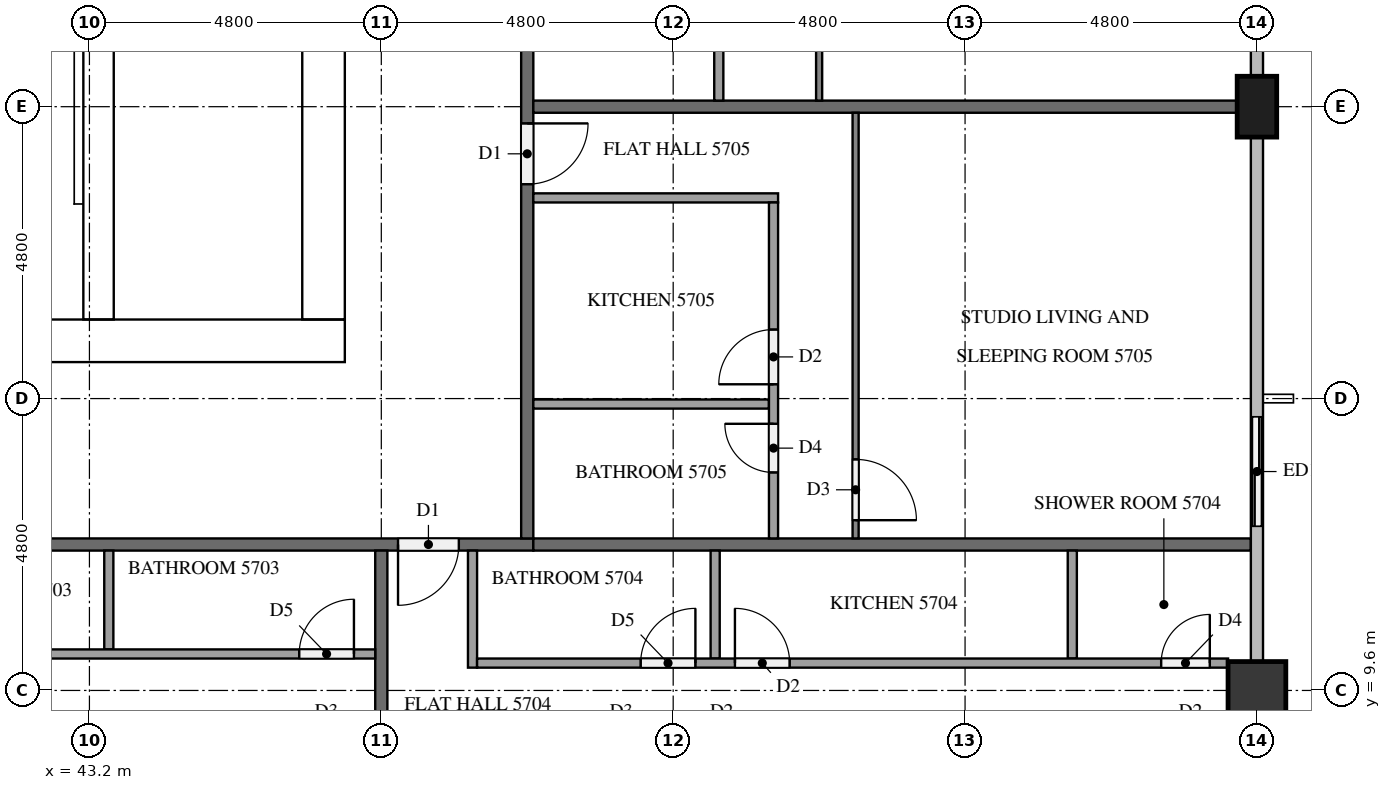
"""IFC4 building model, lengths in metres.
Left out: names, types, materials, properties, quantities, classifications, styles, units other than length and angle.
Written with IfcOpenShell. Run it as: python <this file> out.ifc"""

import sys

from ifc_helpers import new_model, si_unit, direction, frame, frame_2d, origin, origin_2d, place, context, subcontext, project, spatial, rectangle, extrude, element, fill, save


model = new_model("IFC4")
c1 = context("Model", 3, precision=1e-05, world=origin(), true_north=direction((0.0, 1.0)))
c2 = subcontext(c1, "Body", "Model", "MODEL_VIEW")
j1 = project(units=[si_unit("LENGTHUNIT", "METRE"), si_unit("PLANEANGLEUNIT", "RADIAN")], contexts=[c1])
p1 = place(None, origin())
s1 = spatial("IfcSite", under=j1, at=p1, CompositionType="ELEMENT")
p2 = place(p1, origin())
s2 = spatial("IfcBuilding", under=s1, at=p2, CompositionType="ELEMENT")
p3 = place(p2, frame((0.0, 0.0, 219.3)))
s3 = spatial("IfcBuildingStorey", under=s2, at=p3, CompositionType="ELEMENT", Elevation=219.3)
p4 = place(p3, frame((15.0, 15.35, 0.0), z_axis=(0.0, 0.0, 1.0), x_axis=(1.0, 0.0, 0.0)))
e1 = element("IfcWall", 1, at=p4, inside=s3, PredefinedType="SHEAR", context=c2, shape_type="SweptSolid", body=[
    extrude(rectangle(XDim=32.4, YDim=0.7, at=frame_2d((16.2, 0.0))), origin(), (0.0, 0.0, 1.0), 3.2),
])
p5 = place(p4, frame((15.3, 0.0, 0.0)))
e2 = element("IfcOpeningElement", 2, at=p5, cuts=e1, PredefinedType="OPENING", context=c2, shape_type="SweptSolid", body=[
    extrude(rectangle(XDim=1.8, YDim=2.1, at=frame_2d((0.9, 1.05))), frame((0.0, 0.36, 0.0), z_axis=(0.0, -1.0, 0.0), x_axis=(1.0, 0.0, 0.0)), (0.0, 0.0, 1.0), 0.72),
])
p6 = place(p3, frame((47.05, 15.7, 0.0), z_axis=(0.0, 0.0, 1.0), x_axis=(0.0, 1.0, 0.0)))
e3 = element("IfcWall", 3, at=p6, inside=s3, PredefinedType="SHEAR", context=c2, shape_type="SweptSolid", body=[
    extrude(rectangle(XDim=21.4, YDim=0.7, at=frame_2d((10.7, 0.0))), origin(), (0.0, 0.0, 1.0), 3.2),
])
p7 = place(p6, frame((10.4, 0.0, 0.0)))
e4 = element("IfcOpeningElement", 4, at=p7, cuts=e3, PredefinedType="OPENING", context=c2, shape_type="SweptSolid", body=[
    extrude(rectangle(XDim=1.2, YDim=2.1, at=frame_2d((0.6, 1.05))), frame((0.0, 0.36, 0.0), z_axis=(0.0, -1.0, 0.0), x_axis=(1.0, 0.0, 0.0)), (0.0, 0.0, 1.0), 0.72),
])
p8 = place(p3, frame((43.35, 15.7, 0.0), z_axis=(0.0, 0.0, 1.0), x_axis=(0.0, 1.0, 0.0)))
e5 = element("IfcWall", 5, at=p8, inside=s3, PredefinedType="SHEAR", context=c2, shape_type="SweptSolid", body=[
    extrude(rectangle(XDim=8.55, YDim=0.5, at=frame_2d((4.275, 0.0))), origin(), (0.0, 0.0, 1.0), 3.2),
])
p9 = place(p8, frame((0.5, 0.0, 0.0)))
e6 = element("IfcOpeningElement", 6, at=p9, cuts=e5, PredefinedType="OPENING", context=c2, shape_type="SweptSolid", body=[
    extrude(rectangle(XDim=1.2, YDim=2.1, at=frame_2d((0.6, 1.05))), frame((0.0, 0.26, 0.0), z_axis=(0.0, -1.0, 0.0), x_axis=(1.0, 0.0, 0.0)), (0.0, 0.0, 1.0), 0.52),
])
p10 = place(p3, frame((62.4, 9.6, 0.0), z_axis=(0.0, 0.0, 1.0), x_axis=(1.0, 0.0, 0.0)))
e7 = element("IfcColumn", 7, at=p10, inside=s3, PredefinedType="COLUMN", context=c2, shape_type="SweptSolid", body=[
    extrude(rectangle(XDim=0.95, YDim=0.95, at=origin_2d()), origin(), (0.0, 0.0, 1.0), 3.2),
])
p11 = place(p3, frame((62.4, 19.2, 0.0), z_axis=(0.0, 0.0, 1.0), x_axis=(0.0, 1.0, 0.0)))
e8 = element("IfcColumn", 8, at=p11, inside=s3, PredefinedType="COLUMN", context=c2, shape_type="SweptSolid", body=[
    extrude(rectangle(XDim=1.0, YDim=0.65, at=origin_2d()), origin(), (0.0, 0.0, 1.0), 3.2),
])
p12 = place(p3, frame((62.4, 12.0, 0.0), z_axis=(0.0, 0.0, 1.0), x_axis=(0.0, 1.0, 0.0)))
e9 = element("IfcWall", 9, at=p12, inside=s3, PredefinedType="SOLIDWALL", context=c2, shape_type="SweptSolid", body=[
    extrude(rectangle(XDim=2.4, YDim=0.15, at=frame_2d((1.2, 0.0))), origin(), (0.0, 0.0, 1.0), 3.2),
])
p13 = place(p12, frame((0.3, 0.0, 0.0)))
e10 = element("IfcOpeningElement", 10, at=p13, cuts=e9, PredefinedType="OPENING", context=c2, shape_type="SweptSolid", body=[
    extrude(rectangle(XDim=1.8, YDim=2.4, at=frame_2d((0.9, 1.2))), frame((0.0, 0.085, 0.0), z_axis=(0.0, -1.0, 0.0), x_axis=(1.0, 0.0, 0.0)), (0.0, 0.0, 1.0), 0.17),
])
p14 = place(p3, frame((50.5, 12.0, 0.0), z_axis=(0.0, 0.0, 1.0), x_axis=(-1.0, 0.0, 0.0)))
e11 = element("IfcWall", 11, at=p14, inside=s3, PredefinedType="PARTITIONING", context=c2, shape_type="SweptSolid", body=[
    extrude(rectangle(XDim=38.6, YDim=0.2, at=frame_2d((19.3, 0.0))), origin(), (0.0, 0.0, 1.0), 3.2),
])
p15 = place(p14, frame((36.375, 0.0, 0.0)))
e12 = element("IfcOpeningElement", 12, at=p15, cuts=e11, PredefinedType="OPENING", context=c2, shape_type="SweptSolid", body=[
    extrude(rectangle(XDim=1.0, YDim=2.1, at=frame_2d((0.5, 1.05))), frame((0.0, 0.11, 0.0), z_axis=(0.0, -1.0, 0.0), x_axis=(1.0, 0.0, 0.0)), (0.0, 0.0, 1.0), 0.22),
])
p16 = place(p14, frame((34.825, 0.0, 0.0)))
e13 = element("IfcOpeningElement", 13, at=p16, cuts=e11, PredefinedType="OPENING", context=c2, shape_type="SweptSolid", body=[
    extrude(rectangle(XDim=1.0, YDim=2.1, at=frame_2d((0.5, 1.05))), frame((0.0, 0.11, 0.0), z_axis=(0.0, -1.0, 0.0), x_axis=(1.0, 0.0, 0.0)), (0.0, 0.0, 1.0), 0.22),
])
p17 = place(p14, frame((20.375, 0.0, 0.0)))
e14 = element("IfcOpeningElement", 14, at=p17, cuts=e11, PredefinedType="OPENING", context=c2, shape_type="SweptSolid", body=[
    extrude(rectangle(XDim=1.1, YDim=2.1, at=frame_2d((0.55, 1.05))), frame((0.0, 0.11, 0.0), z_axis=(0.0, -1.0, 0.0), x_axis=(1.0, 0.0, 0.0)), (0.0, 0.0, 1.0), 0.22),
])
p18 = place(p14, frame((1.225, 0.0, 0.0)))
e15 = element("IfcOpeningElement", 15, at=p18, cuts=e11, PredefinedType="OPENING", context=c2, shape_type="SweptSolid", body=[
    extrude(rectangle(XDim=1.0, YDim=2.1, at=frame_2d((0.5, 1.05))), frame((0.0, 0.11, 0.0), z_axis=(0.0, -1.0, 0.0), x_axis=(1.0, 0.0, 0.0)), (0.0, 0.0, 1.0), 0.22),
])
p19 = place(p3, frame((50.4, 40.7, 0.0), z_axis=(0.0, 0.0, 1.0), x_axis=(0.0, -1.0, 0.0)))
e16 = element("IfcWall", 16, at=p19, inside=s3, PredefinedType="PARTITIONING", context=c2, shape_type="SweptSolid", body=[
    extrude(rectangle(XDim=28.6, YDim=0.2, at=frame_2d((14.3, 0.0))), origin(), (0.0, 0.0, 1.0), 3.2),
])
p20 = place(p19, frame((21.775, 0.0, 0.0)))
e17 = element("IfcOpeningElement", 17, at=p20, cuts=e16, PredefinedType="OPENING", context=c2, shape_type="SweptSolid", body=[
    extrude(rectangle(XDim=1.0, YDim=2.1, at=frame_2d((0.5, 1.05))), frame((0.0, 0.11, 0.0), z_axis=(0.0, -1.0, 0.0), x_axis=(1.0, 0.0, 0.0)), (0.0, 0.0, 1.0), 0.22),
])
p21 = place(p19, frame((7.375, 0.0, 0.0)))
e18 = element("IfcOpeningElement", 18, at=p21, cuts=e16, PredefinedType="OPENING", context=c2, shape_type="SweptSolid", body=[
    extrude(rectangle(XDim=1.0, YDim=2.1, at=frame_2d((0.5, 1.05))), frame((0.0, 0.11, 0.0), z_axis=(0.0, -1.0, 0.0), x_axis=(1.0, 0.0, 0.0)), (0.0, 0.0, 1.0), 0.22),
])
p22 = place(p19, frame((0.175, 0.0, 0.0)))
e19 = element("IfcOpeningElement", 19, at=p22, cuts=e16, PredefinedType="OPENING", context=c2, shape_type="SweptSolid", body=[
    extrude(rectangle(XDim=1.0, YDim=2.1, at=frame_2d((0.5, 1.05))), frame((0.0, 0.11, 0.0), z_axis=(0.0, -1.0, 0.0), x_axis=(1.0, 0.0, 0.0)), (0.0, 0.0, 1.0), 0.22),
])
p23 = place(p3, frame((48.0, 11.9, 0.0), z_axis=(0.0, 0.0, 1.0), x_axis=(0.0, -1.0, 0.0)))
e20 = element("IfcWall", 20, at=p23, inside=s3, PredefinedType="PARTITIONING", context=c2, shape_type="SweptSolid", body=[
    extrude(rectangle(XDim=6.775, YDim=0.2, at=frame_2d((3.387, 0.0))), origin(), (0.0, 0.0, 1.0), 3.2),
])
p24 = place(p3, frame((50.5, 12.0, 0.0), z_axis=(0.0, 0.0, 1.0), x_axis=(1.0, 0.0, 0.0)))
e21 = element("IfcWall", 21, at=p24, inside=s3, PredefinedType="PARTITIONING", context=c2, shape_type="SweptSolid", body=[
    extrude(rectangle(XDim=11.8, YDim=0.2, at=frame_2d((5.9, 0.0))), origin(), (0.0, 0.0, 1.0), 3.2),
])
p25 = place(p3, frame((50.5, 19.2, 0.0), z_axis=(0.0, 0.0, 1.0), x_axis=(1.0, 0.0, 0.0)))
e22 = element("IfcWall", 22, at=p25, inside=s3, PredefinedType="PARTITIONING", context=c2, shape_type="SweptSolid", body=[
    extrude(rectangle(XDim=11.575, YDim=0.2, at=frame_2d((5.788, 0.0))), origin(), (0.0, 0.0, 1.0), 3.2),
])
p26 = place(p3, frame((43.519, 11.9, 0.0), z_axis=(0.0, 0.0, 1.0), x_axis=(0.0, -1.0, 0.0)))
e23 = element("IfcWall", 23, at=p26, inside=s3, PredefinedType="PARTITIONING", context=c2, shape_type="SweptSolid", body=[
    extrude(rectangle(XDim=1.625, YDim=0.15, at=frame_2d((0.812, 0.0))), origin(), (0.0, 0.0, 1.0), 3.2),
])
p27 = place(p3, frame((30.375, 10.2, 0.0), z_axis=(0.0, 0.0, 1.0), x_axis=(1.0, 0.0, 0.0)))
e24 = element("IfcWall", 24, at=p27, inside=s3, PredefinedType="PARTITIONING", context=c2, shape_type="SweptSolid", body=[
    extrude(rectangle(XDim=17.525, YDim=0.15, at=frame_2d((8.762, 0.0))), origin(), (0.0, 0.0, 1.0), 3.2),
])
p28 = place(p27, frame((0.3, 0.0, 0.0)))
e25 = element("IfcOpeningElement", 25, at=p28, cuts=e24, PredefinedType="OPENING", context=c2, shape_type="SweptSolid", body=[
    extrude(rectangle(XDim=0.9, YDim=2.1, at=frame_2d((0.45, 1.05))), frame((0.0, 0.085, 0.0), z_axis=(0.0, -1.0, 0.0), x_axis=(1.0, 0.0, 0.0)), (0.0, 0.0, 1.0), 0.17),
])
p29 = place(p27, frame((8.733, 0.0, 0.0)))
e26 = element("IfcOpeningElement", 26, at=p29, cuts=e24, PredefinedType="OPENING", context=c2, shape_type="SweptSolid", body=[
    extrude(rectangle(XDim=0.8, YDim=2.1, at=frame_2d((0.4, 1.05))), frame((0.0, 0.085, 0.0), z_axis=(0.0, -1.0, 0.0), x_axis=(1.0, 0.0, 0.0)), (0.0, 0.0, 1.0), 0.17),
])
p30 = place(p27, frame((10.183, 0.0, 0.0)))
e27 = element("IfcOpeningElement", 27, at=p30, cuts=e24, PredefinedType="OPENING", context=c2, shape_type="SweptSolid", body=[
    extrude(rectangle(XDim=0.8, YDim=2.1, at=frame_2d((0.4, 1.05))), frame((0.0, 0.085, 0.0), z_axis=(0.0, -1.0, 0.0), x_axis=(1.0, 0.0, 0.0)), (0.0, 0.0, 1.0), 0.17),
])
p31 = place(p27, frame((16.275, 0.0, 0.0)))
e28 = element("IfcOpeningElement", 28, at=p31, cuts=e24, PredefinedType="OPENING", context=c2, shape_type="SweptSolid", body=[
    extrude(rectangle(XDim=0.9, YDim=2.1, at=frame_2d((0.45, 1.05))), frame((0.0, 0.085, 0.0), z_axis=(0.0, -1.0, 0.0), x_axis=(1.0, 0.0, 0.0)), (0.0, 0.0, 1.0), 0.17),
])
for number, where, z_axis, x_axis in (
    (29, (53.49, 11.9, 0.0), (0.0, 0.0, 1.0), (0.0, -1.0, 0.0)),
    (30, (59.364, 11.9, 0.0), (0.0, 0.0, 1.0), (0.0, -1.0, 0.0)),
):
    element("IfcWall", number, at=place(p3, frame(where, z_axis=z_axis, x_axis=x_axis)), inside=s3, PredefinedType="PARTITIONING", context=c2, shape_type="SweptSolid", body=[
        extrude(rectangle(XDim=1.775, YDim=0.15, at=frame_2d((0.887, 0.0))), origin(), (0.0, 0.0, 1.0), 3.2),
    ])
p32 = place(p3, frame((49.5, 11.9, 0.0), z_axis=(0.0, 0.0, 1.0), x_axis=(0.0, -1.0, 0.0)))
e31 = element("IfcWall", 31, at=p32, inside=s3, PredefinedType="PARTITIONING", context=c2, shape_type="SweptSolid", body=[
    extrude(rectangle(XDim=1.925, YDim=0.15, at=frame_2d((0.962, 0.0))), origin(), (0.0, 0.0, 1.0), 3.2),
])
p33 = place(p3, frame((49.575, 10.05, 0.0), z_axis=(0.0, 0.0, 1.0), x_axis=(1.0, 0.0, 0.0)))
e32 = element("IfcWall", 32, at=p33, inside=s3, PredefinedType="PARTITIONING", context=c2, shape_type="SweptSolid", body=[
    extrude(rectangle(XDim=12.35, YDim=0.15, at=frame_2d((6.175, 0.0))), origin(), (0.0, 0.0, 1.0), 3.2),
])
p34 = place(p33, frame((2.69, 0.0, 0.0)))
e33 = element("IfcOpeningElement", 33, at=p34, cuts=e32, PredefinedType="OPENING", context=c2, shape_type="SweptSolid", body=[
    extrude(rectangle(XDim=0.9, YDim=2.1, at=frame_2d((0.45, 1.05))), frame((0.0, 0.085, 0.0), z_axis=(0.0, -1.0, 0.0), x_axis=(1.0, 0.0, 0.0)), (0.0, 0.0, 1.0), 0.17),
])
p35 = place(p33, frame((4.24, 0.0, 0.0)))
e34 = element("IfcOpeningElement", 34, at=p35, cuts=e32, PredefinedType="OPENING", context=c2, shape_type="SweptSolid", body=[
    extrude(rectangle(XDim=0.9, YDim=2.1, at=frame_2d((0.45, 1.05))), frame((0.0, 0.085, 0.0), z_axis=(0.0, -1.0, 0.0), x_axis=(1.0, 0.0, 0.0)), (0.0, 0.0, 1.0), 0.17),
])
p36 = place(p33, frame((11.25, 0.0, 0.0)))
e35 = element("IfcOpeningElement", 35, at=p36, cuts=e32, PredefinedType="OPENING", context=c2, shape_type="SweptSolid", body=[
    extrude(rectangle(XDim=0.8, YDim=2.1, at=frame_2d((0.4, 1.05))), frame((0.0, 0.085, 0.0), z_axis=(0.0, -1.0, 0.0), x_axis=(1.0, 0.0, 0.0)), (0.0, 0.0, 1.0), 0.17),
])
p37 = place(p3, frame((55.8, 19.1, 0.0), z_axis=(0.0, 0.0, 1.0), x_axis=(0.0, -1.0, 0.0)))
e36 = element("IfcWall", 36, at=p37, inside=s3, PredefinedType="PARTITIONING", context=c2, shape_type="SweptSolid", body=[
    extrude(rectangle(XDim=7.0, YDim=0.1, at=frame_2d((3.5, 0.0))), origin(), (0.0, 0.0, 1.0), 3.2),
])
p38 = place(p37, frame((5.7, 0.0, 0.0)))
e37 = element("IfcOpeningElement", 37, at=p38, cuts=e36, PredefinedType="OPENING", context=c2, shape_type="SweptSolid", body=[
    extrude(rectangle(XDim=1.0, YDim=2.1, at=frame_2d((0.5, 1.05))), frame((0.0, 0.06, 0.0), z_axis=(0.0, -1.0, 0.0), x_axis=(1.0, 0.0, 0.0)), (0.0, 0.0, 1.0), 0.12),
])
p39 = place(p3, frame((50.5, 14.31, 0.0), z_axis=(0.0, 0.0, 1.0), x_axis=(1.0, 0.0, 0.0)))
e38 = element("IfcWall", 38, at=p39, inside=s3, PredefinedType="PARTITIONING", context=c2, shape_type="SweptSolid", body=[
    extrude(rectangle(XDim=3.875, YDim=0.15, at=frame_2d((1.938, 0.0))), origin(), (0.0, 0.0, 1.0), 3.2),
])
p40 = place(p3, frame((50.5, 17.7, 0.0), z_axis=(0.0, 0.0, 1.0), x_axis=(1.0, 0.0, 0.0)))
e39 = element("IfcWall", 39, at=p40, inside=s3, PredefinedType="PARTITIONING", context=c2, shape_type="SweptSolid", body=[
    extrude(rectangle(XDim=4.025, YDim=0.15, at=frame_2d((2.012, 0.0))), origin(), (0.0, 0.0, 1.0), 3.2),
])
p41 = place(p3, frame((54.45, 12.1, 0.0), z_axis=(0.0, 0.0, 1.0), x_axis=(0.0, 1.0, 0.0)))
e40 = element("IfcWall", 40, at=p41, inside=s3, PredefinedType="PARTITIONING", context=c2, shape_type="SweptSolid", body=[
    extrude(rectangle(XDim=5.525, YDim=0.15, at=frame_2d((2.762, 0.0))), origin(), (0.0, 0.0, 1.0), 3.2),
])
p42 = place(p41, frame((2.535, 0.0, 0.0)))
e41 = element("IfcOpeningElement", 41, at=p42, cuts=e40, PredefinedType="OPENING", context=c2, shape_type="SweptSolid", body=[
    extrude(rectangle(XDim=0.9, YDim=2.1, at=frame_2d((0.45, 1.05))), frame((0.0, 0.085, 0.0), z_axis=(0.0, -1.0, 0.0), x_axis=(1.0, 0.0, 0.0)), (0.0, 0.0, 1.0), 0.17),
])
p43 = place(p41, frame((1.085, 0.0, 0.0)))
e42 = element("IfcOpeningElement", 42, at=p43, cuts=e40, PredefinedType="OPENING", context=c2, shape_type="SweptSolid", body=[
    extrude(rectangle(XDim=0.8, YDim=2.1, at=frame_2d((0.4, 1.05))), frame((0.0, 0.085, 0.0), z_axis=(0.0, -1.0, 0.0), x_axis=(1.0, 0.0, 0.0)), (0.0, 0.0, 1.0), 0.17),
])
p44 = place(p3, frame((55.2, 33.5, 0.0), z_axis=(0.0, 0.0, 1.0), x_axis=(0.0, -1.0, 0.0)))
e43 = element("IfcWall", 43, at=p44, inside=s3, PredefinedType="PARTITIONING", context=c2, shape_type="SweptSolid", body=[
    extrude(rectangle(XDim=14.2, YDim=0.1, at=frame_2d((7.1, 0.0))), origin(), (0.0, 0.0, 1.0), 3.2),
])
p45 = place(p44, frame((0.3, 0.0, 0.0)))
e44 = element("IfcOpeningElement", 44, at=p45, cuts=e43, PredefinedType="OPENING", context=c2, shape_type="SweptSolid", body=[
    extrude(rectangle(XDim=0.9, YDim=2.1, at=frame_2d((0.45, 1.05))), frame((0.0, 0.06, 0.0), z_axis=(0.0, -1.0, 0.0), x_axis=(1.0, 0.0, 0.0)), (0.0, 0.0, 1.0), 0.12),
])
p46 = place(p44, frame((8.25, 0.0, 0.0)))
e45 = element("IfcOpeningElement", 45, at=p46, cuts=e43, PredefinedType="OPENING", context=c2, shape_type="SweptSolid", body=[
    extrude(rectangle(XDim=0.9, YDim=2.1, at=frame_2d((0.45, 1.05))), frame((0.0, 0.06, 0.0), z_axis=(0.0, -1.0, 0.0), x_axis=(1.0, 0.0, 0.0)), (0.0, 0.0, 1.0), 0.12),
])
p47 = place(p44, frame((9.85, 0.0, 0.0)))
e46 = element("IfcOpeningElement", 46, at=p47, cuts=e43, PredefinedType="OPENING", context=c2, shape_type="SweptSolid", body=[
    extrude(rectangle(XDim=1.0, YDim=2.1, at=frame_2d((0.5, 1.05))), frame((0.0, 0.06, 0.0), z_axis=(0.0, -1.0, 0.0), x_axis=(1.0, 0.0, 0.0)), (0.0, 0.0, 1.0), 0.12),
])
p48 = place(p3, frame((53.55, 19.3, 0.0), z_axis=(0.0, 0.0, 1.0), x_axis=(0.0, 1.0, 0.0)))
e47 = element("IfcWall", 47, at=p48, inside=s3, PredefinedType="PARTITIONING", context=c2, shape_type="SweptSolid", body=[
    extrude(rectangle(XDim=12.725, YDim=0.15, at=frame_2d((6.362, 0.0))), origin(), (0.0, 0.0, 1.0), 3.2),
])
p49 = place(p48, frame((11.525, 0.0, 0.0)))
e48 = element("IfcOpeningElement", 48, at=p49, cuts=e47, PredefinedType="OPENING", context=c2, shape_type="SweptSolid", body=[
    extrude(rectangle(XDim=0.9, YDim=2.1, at=frame_2d((0.45, 1.05))), frame((0.0, 0.085, 0.0), z_axis=(0.0, -1.0, 0.0), x_axis=(1.0, 0.0, 0.0)), (0.0, 0.0, 1.0), 0.17),
])
p50 = place(p48, frame((3.261, 0.0, 0.0)))
e49 = element("IfcOpeningElement", 49, at=p50, cuts=e47, PredefinedType="OPENING", context=c2, shape_type="SweptSolid", body=[
    extrude(rectangle(XDim=0.9, YDim=2.1, at=frame_2d((0.45, 1.05))), frame((0.0, 0.085, 0.0), z_axis=(0.0, -1.0, 0.0), x_axis=(1.0, 0.0, 0.0)), (0.0, 0.0, 1.0), 0.17),
])
p51 = place(p48, frame((1.812, 0.0, 0.0)))
e50 = element("IfcOpeningElement", 50, at=p51, cuts=e47, PredefinedType="OPENING", context=c2, shape_type="SweptSolid", body=[
    extrude(rectangle(XDim=0.8, YDim=2.1, at=frame_2d((0.4, 1.05))), frame((0.0, 0.085, 0.0), z_axis=(0.0, -1.0, 0.0), x_axis=(1.0, 0.0, 0.0)), (0.0, 0.0, 1.0), 0.17),
])
p52 = place(p13, origin())
e51 = element("IfcDoor", 51, at=p52, inside=s3, OperationType="SLIDING_TO_LEFT", PredefinedType="DOOR", context=c2, shape_type="SweptSolid", body=[
    extrude(rectangle(XDim=1.8, YDim=2.4, at=frame_2d((0.9, 1.2))), frame((0.0, 0.025, 0.0), z_axis=(0.0, -1.0, 0.0), x_axis=(1.0, 0.0, 0.0)), (0.0, 0.0, 1.0), 0.05),
])
fill(e10, e51)
p53 = place(p9, origin())
e52 = element("IfcDoor", 52, at=p53, inside=s3, OperationType="SINGLE_SWING_RIGHT", PredefinedType="DOOR", context=c2, shape_type="SweptSolid", body=[
    extrude(rectangle(XDim=1.2, YDim=2.1, at=frame_2d((0.6, 1.05))), frame((0.0, 0.025, 0.0), z_axis=(0.0, -1.0, 0.0), x_axis=(1.0, 0.0, 0.0)), (0.0, 0.0, 1.0), 0.05),
])
fill(e6, e52)
p54 = place(p18, origin())
e53 = element("IfcDoor", 53, at=p54, inside=s3, OperationType="SINGLE_SWING_RIGHT", PredefinedType="DOOR", context=c2, shape_type="SweptSolid", body=[
    extrude(rectangle(XDim=1.0, YDim=2.1, at=frame_2d((0.5, 1.05))), frame((0.0, 0.025, 0.0), z_axis=(0.0, -1.0, 0.0), x_axis=(1.0, 0.0, 0.0)), (0.0, 0.0, 1.0), 0.05),
])
fill(e15, e53)
p55 = place(p20, origin())
e54 = element("IfcDoor", 54, at=p55, inside=s3, OperationType="SINGLE_SWING_LEFT", PredefinedType="DOOR", context=c2, shape_type="SweptSolid", body=[
    extrude(rectangle(XDim=1.0, YDim=2.1, at=frame_2d((0.5, 1.05))), frame((0.0, 0.025, 0.0), z_axis=(0.0, -1.0, 0.0), x_axis=(1.0, 0.0, 0.0)), (0.0, 0.0, 1.0), 0.05),
])
fill(e17, e54)
p56 = place(p31, origin())
e55 = element("IfcDoor", 55, at=p56, inside=s3, OperationType="SINGLE_SWING_RIGHT", PredefinedType="DOOR", context=c2, shape_type="SweptSolid", body=[
    extrude(rectangle(XDim=0.9, YDim=2.1, at=frame_2d((0.45, 1.05))), frame((0.0, 0.025, 0.0), z_axis=(0.0, -1.0, 0.0), x_axis=(1.0, 0.0, 0.0)), (0.0, 0.0, 1.0), 0.05),
])
fill(e28, e55)
p57 = place(p34, origin())
e56 = element("IfcDoor", 56, at=p57, inside=s3, OperationType="SINGLE_SWING_RIGHT", PredefinedType="DOOR", context=c2, shape_type="SweptSolid", body=[
    extrude(rectangle(XDim=0.9, YDim=2.1, at=frame_2d((0.45, 1.05))), frame((0.0, 0.025, 0.0), z_axis=(0.0, -1.0, 0.0), x_axis=(1.0, 0.0, 0.0)), (0.0, 0.0, 1.0), 0.05),
])
fill(e33, e56)
p58 = place(p35, origin())
e57 = element("IfcDoor", 57, at=p58, inside=s3, OperationType="SINGLE_SWING_LEFT", PredefinedType="DOOR", context=c2, shape_type="SweptSolid", body=[
    extrude(rectangle(XDim=0.9, YDim=2.1, at=frame_2d((0.45, 1.05))), frame((0.0, 0.025, 0.0), z_axis=(0.0, -1.0, 0.0), x_axis=(1.0, 0.0, 0.0)), (0.0, 0.0, 1.0), 0.05),
])
fill(e34, e57)
p59 = place(p36, origin())
e58 = element("IfcDoor", 58, at=p59, inside=s3, OperationType="SINGLE_SWING_RIGHT", PredefinedType="DOOR", context=c2, shape_type="SweptSolid", body=[
    extrude(rectangle(XDim=0.8, YDim=2.1, at=frame_2d((0.4, 1.05))), frame((0.0, 0.025, 0.0), z_axis=(0.0, -1.0, 0.0), x_axis=(1.0, 0.0, 0.0)), (0.0, 0.0, 1.0), 0.05),
])
fill(e35, e58)
p60 = place(p38, origin())
e59 = element("IfcDoor", 59, at=p60, inside=s3, OperationType="SINGLE_SWING_RIGHT", PredefinedType="DOOR", context=c2, shape_type="SweptSolid", body=[
    extrude(rectangle(XDim=1.0, YDim=2.1, at=frame_2d((0.5, 1.05))), frame((0.0, 0.025, 0.0), z_axis=(0.0, -1.0, 0.0), x_axis=(1.0, 0.0, 0.0)), (0.0, 0.0, 1.0), 0.05),
])
fill(e37, e59)
p61 = place(p42, origin())
e60 = element("IfcDoor", 60, at=p61, inside=s3, OperationType="SINGLE_SWING_LEFT", PredefinedType="DOOR", context=c2, shape_type="SweptSolid", body=[
    extrude(rectangle(XDim=0.9, YDim=2.1, at=frame_2d((0.45, 1.05))), frame((0.0, 0.025, 0.0), z_axis=(0.0, -1.0, 0.0), x_axis=(1.0, 0.0, 0.0)), (0.0, 0.0, 1.0), 0.05),
])
fill(e41, e60)
p62 = place(p43, origin())
e61 = element("IfcDoor", 61, at=p62, inside=s3, OperationType="SINGLE_SWING_RIGHT", PredefinedType="DOOR", context=c2, shape_type="SweptSolid", body=[
    extrude(rectangle(XDim=0.8, YDim=2.1, at=frame_2d((0.4, 1.05))), frame((0.0, 0.025, 0.0), z_axis=(0.0, -1.0, 0.0), x_axis=(1.0, 0.0, 0.0)), (0.0, 0.0, 1.0), 0.05),
])
fill(e42, e61)
save(model, sys.argv[1])
